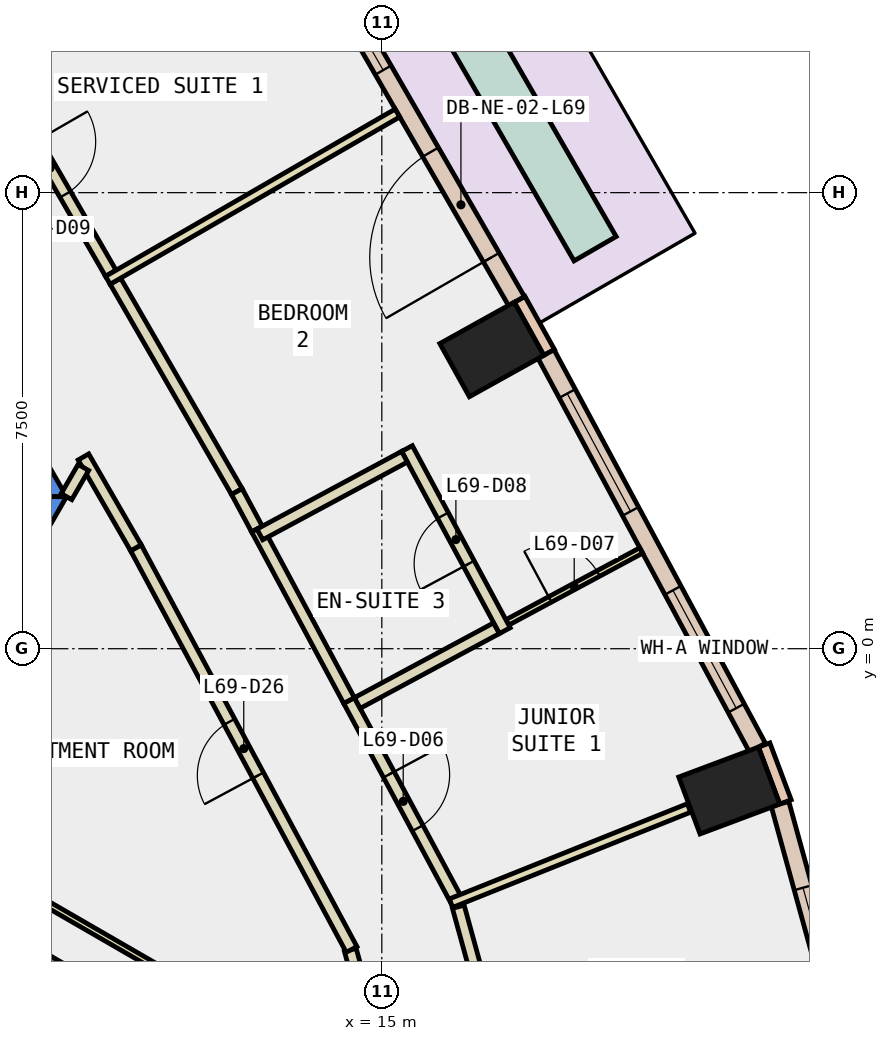
"""IFC4 building model, lengths in metres.
Left out: names, types, materials, properties, quantities, classifications, styles, units other than length and angle.
Written with IfcOpenShell. Run it as: python <this file> out.ifc"""

import sys

from ifc_helpers import new_model, si_unit, direction, frame, frame_2d, origin, origin_2d, place, context, subcontext, project, spatial, polyline, rectangle, outline, extrude, element, fill, save


model = new_model("IFC4")
c1 = context("Model", 3, precision=1e-05, world=origin(), true_north=direction((0.0, 1.0)))
c2 = subcontext(c1, "Body", "Model", "MODEL_VIEW")
j1 = project(units=[si_unit("LENGTHUNIT", "METRE"), si_unit("PLANEANGLEUNIT", "RADIAN")], contexts=[c1])
p1 = place(None, origin())
s1 = spatial("IfcSite", under=j1, at=p1, CompositionType="ELEMENT")
p2 = place(p1, origin())
s2 = spatial("IfcBuilding", under=s1, at=p2, CompositionType="ELEMENT")
p3 = place(p2, frame((0.0, 0.0, 297.2)))
s3 = spatial("IfcBuildingStorey", under=s2, at=p3, CompositionType="ELEMENT", Elevation=297.2)
for number, where, z_axis, x_axis in (
    (1, (20.714, -2.333, -0.34), (0.0, 0.0, 1.0), (-0.351, 0.936, 0.0)),
    (2, (16.809, 4.921, -0.34), (0.0, 0.0, 1.0), (-0.486, 0.874, 0.0)),
):
    element("IfcColumn", number, at=place(p3, frame(where, z_axis=z_axis, x_axis=x_axis)), inside=s3, PredefinedType="COLUMN", context=c2, shape_type="SweptSolid", body=[
        extrude(rectangle(XDim=1.0, YDim=1.4, at=origin_2d()), origin(), (0.0, 0.0, 1.0), 3.6),
    ])
p4 = place(p3, frame((0.0, 0.0, -0.34)))
e3 = element("IfcWall", 3, at=p4, inside=s3, PredefinedType="SHEAR", context=c2, shape_type="SweptSolid", body=[
    extrude(outline(polyline([(5.486, 9.998), (5.053, 9.748), (9.238, 2.5), (9.815, 2.5), (5.486, 9.998)])), origin(), (0.0, 0.0, 1.0), 3.6),
])
p5 = place(p3, frame((0.0, 0.0, -0.34)))
e4 = element("IfcWall", 4, at=p5, inside=s3, PredefinedType="SHEAR", context=c2, shape_type="SweptSolid", body=[
    extrude(outline(polyline([(4.907, -6.0), (9.815, 2.5), (9.238, 2.5), (4.619, -5.5), (4.907, -6.0)])), origin(), (0.0, 0.0, 1.0), 3.6),
])
p6 = place(p3, frame((6.279, -3.625, -0.34), z_axis=(0.0, 0.0, 1.0), x_axis=(0.866017533419, -0.500013631625, 0.0)))
e5 = element("IfcWall", 5, at=p6, inside=s3, PredefinedType="SHEAR", context=c2, shape_type="SweptSolid", body=[
    extrude(rectangle(XDim=9.0, YDim=0.8, at=frame_2d((4.5, 0.0))), origin(), (0.0, 0.0, 1.0), 3.6),
])
p7 = place(p3, frame((21.639, -2.52, 0.0), z_axis=(0.0, 0.0, 1.0), x_axis=(-0.350962844851, 0.936389385637, 0.0)))
e6 = element("IfcWall", 6, at=p7, inside=s3, PredefinedType="STANDARD", context=c2, shape_type="SweptSolid", body=[
    extrude(rectangle(XDim=1.0, YDim=0.2, at=frame_2d((0.5, 0.0))), origin(), (0.0, 0.0, 1.0), 3.26),
])
p8 = place(p3, frame((17.752, 4.872, 0.0), z_axis=(0.0, 0.0, 1.0), x_axis=(-0.485850211157, 0.874042088414, 0.0)))
e7 = element("IfcWall", 7, at=p8, inside=s3, PredefinedType="STANDARD", context=c2, shape_type="SweptSolid", body=[
    extrude(rectangle(XDim=1.0, YDim=0.2, at=frame_2d((0.5, 0.0))), origin(), (0.0, 0.0, 1.0), 3.26),
])
p9 = place(p3, frame((22.677, -6.659, 0.0), z_axis=(0.0, 0.0, 1.0), x_axis=(-0.264892613927, 0.964277917971, 0.0)))
e8 = element("IfcWall", 8, at=p9, inside=s3, PredefinedType="STANDARD", context=c2, shape_type="SweptSolid", body=[
    extrude(rectangle(XDim=4.258, YDim=0.3, at=frame_2d((2.129, 0.0))), origin(), (0.0, 0.0, 1.0), 3.26),
])
p10 = place(p9, frame((1.429, 0.0, 0.9)))
e9 = element("IfcOpeningElement", 9, at=p10, cuts=e8, PredefinedType="OPENING", context=c2, shape_type="SweptSolid", body=[
    extrude(rectangle(XDim=1.4, YDim=2.0, at=frame_2d((0.7, 1.0))), frame((0.0, 0.16, 0.0), z_axis=(0.0, -1.0, 0.0), x_axis=(1.0, 0.0, 0.0)), (0.0, 0.0, 1.0), 0.32),
])
p11 = place(p3, frame((21.177, -1.626, 0.0), z_axis=(0.0, 0.0, 1.0), x_axis=(-0.473225522632, 0.880941317415, 0.0)))
e10 = element("IfcWall", 10, at=p11, inside=s3, PredefinedType="STANDARD", context=c2, shape_type="SweptSolid", body=[
    extrude(rectangle(XDim=7.345, YDim=0.3, at=frame_2d((3.673, 0.0))), origin(), (0.0, 0.0, 1.0), 3.26),
])
p12 = place(p11, frame((0.736, 0.0, 0.9)))
e11 = element("IfcOpeningElement", 11, at=p12, cuts=e10, PredefinedType="OPENING", context=c2, shape_type="SweptSolid", body=[
    extrude(rectangle(XDim=2.2, YDim=2.0, at=frame_2d((1.1, 1.0))), frame((0.0, 0.16, 0.0), z_axis=(0.0, -1.0, 0.0), x_axis=(1.0, 0.0, 0.0)), (0.0, 0.0, 1.0), 0.32),
])
p13 = place(p11, frame((4.409, 0.0, 0.9)))
e12 = element("IfcOpeningElement", 12, at=p13, cuts=e10, PredefinedType="OPENING", context=c2, shape_type="SweptSolid", body=[
    extrude(rectangle(XDim=2.2, YDim=2.0, at=frame_2d((1.1, 1.0))), frame((0.0, 0.16, 0.0), z_axis=(0.0, -1.0, 0.0), x_axis=(1.0, 0.0, 0.0)), (0.0, 0.0, 1.0), 0.32),
])
p14 = place(p3, frame((17.215, 5.717, 0.0), z_axis=(0.0, 0.0, 1.0), x_axis=(-0.499905472729, 0.866079972252, 0.0)))
e13 = element("IfcWall", 13, at=p14, inside=s3, PredefinedType="STANDARD", context=c2, shape_type="SweptSolid", body=[
    extrude(rectangle(XDim=7.313, YDim=0.3, at=frame_2d((3.657, 0.0))), origin(), (0.0, 0.0, 1.0), 3.26),
])
p15 = place(p14, frame((0.828, 0.0, 0.0)))
e14 = element("IfcOpeningElement", 14, at=p15, cuts=e13, PredefinedType="OPENING", context=c2, shape_type="SweptSolid", body=[
    extrude(rectangle(XDim=2.0, YDim=2.4, at=frame_2d((1.0, 1.2))), frame((0.0, 0.16, 0.0), z_axis=(0.0, -1.0, 0.0), x_axis=(1.0, 0.0, 0.0)), (0.0, 0.0, 1.0), 0.32),
])
p16 = place(p14, frame((4.385, 0.0, 0.9)))
e15 = element("IfcOpeningElement", 15, at=p16, cuts=e13, PredefinedType="OPENING", context=c2, shape_type="SweptSolid", body=[
    extrude(rectangle(XDim=2.2, YDim=2.0, at=frame_2d((1.1, 1.0))), frame((0.0, 0.16, 0.0), z_axis=(0.0, -1.0, 0.0), x_axis=(1.0, 0.0, 0.0)), (0.0, 0.0, 1.0), 0.32),
])
p17 = place(p3, frame((18.508, 6.578, 0.0), z_axis=(0.0, 0.0, 1.0), x_axis=(-0.500043210338, 0.866000454847, 0.0)))
e16 = element("IfcWall", 16, at=p17, inside=s3, PredefinedType="STANDARD", context=c2, shape_type="SweptSolid", body=[
    extrude(rectangle(XDim=7.115, YDim=0.8, at=frame_2d((3.558, 0.0))), origin(), (0.0, 0.0, 1.0), 0.8),
])
p18 = place(p3, frame((14.779, -6.032, 0.0), z_axis=(0.0, 0.0, 1.0), x_axis=(-0.265740072272, 0.964044715762, 0.0)))
e17 = element("IfcWall", 17, at=p18, inside=s3, PredefinedType="PARTITIONING", context=c2, shape_type="SweptSolid", body=[
    extrude(rectangle(XDim=1.118, YDim=0.2, at=frame_2d((0.559, 0.0))), origin(), (0.0, 0.0, 1.0), 3.26),
])
p19 = place(p3, frame((14.503, -4.946, 0.0), z_axis=(0.0, 0.0, 1.0), x_axis=(-0.473101362557, 0.881008002658, 0.0)))
e18 = element("IfcWall", 18, at=p19, inside=s3, PredefinedType="PARTITIONING", context=c2, shape_type="SweptSolid", body=[
    extrude(rectangle(XDim=7.497, YDim=0.2, at=frame_2d((3.749, 0.0))), origin(), (0.0, 0.0, 1.0), 3.26),
])
p20 = place(p19, frame((3.249, 0.0, 0.0)))
e19 = element("IfcOpeningElement", 19, at=p20, cuts=e18, PredefinedType="OPENING", context=c2, shape_type="SweptSolid", body=[
    extrude(rectangle(XDim=1.0, YDim=2.1, at=frame_2d((0.5, 1.05))), frame((0.0, 0.11, 0.0), z_axis=(0.0, -1.0, 0.0), x_axis=(1.0, 0.0, 0.0)), (0.0, 0.0, 1.0), 0.22),
])
p21 = place(p3, frame((10.956, 1.659, 0.0), z_axis=(0.0, 0.0, 1.0), x_axis=(-0.49992648901, 0.866067841215, 0.0)))
e20 = element("IfcWall", 20, at=p21, inside=s3, PredefinedType="PARTITIONING", context=c2, shape_type="SweptSolid", body=[
    extrude(rectangle(XDim=1.726, YDim=0.2, at=frame_2d((0.863, 0.0))), origin(), (0.0, 0.0, 1.0), 3.26),
])
p22 = place(p3, frame((10.092, 2.981, 0.0), z_axis=(0.0, 0.0, 1.0), x_axis=(-0.501296484717, -0.865275582927, 0.0)))
e21 = element("IfcWall", 21, at=p22, inside=s3, PredefinedType="PARTITIONING", context=c2, shape_type="SweptSolid", body=[
    extrude(rectangle(XDim=0.555, YDim=0.2, at=frame_2d((0.277, 0.0))), origin(), (0.0, 0.0, 1.0), 3.26),
])
p23 = place(p3, frame((16.258, -4.244, 0.0), z_axis=(0.0, 0.0, 1.0), x_axis=(0.264930673246, -0.964267462053, 0.0)))
e22 = element("IfcWall", 22, at=p23, inside=s3, PredefinedType="PARTITIONING", context=c2, shape_type="SweptSolid", body=[
    extrude(rectangle(XDim=3.166, YDim=0.2, at=frame_2d((1.583, 0.0))), origin(), (0.0, 0.0, 1.0), 3.26),
])
p24 = place(p3, frame((14.461, -0.852, 0.0), z_axis=(0.0, 0.0, 1.0), x_axis=(0.473160180459, -0.88097641491, 0.0)))
e23 = element("IfcWall", 23, at=p24, inside=s3, PredefinedType="PARTITIONING", context=c2, shape_type="SweptSolid", body=[
    extrude(rectangle(XDim=3.766, YDim=0.2, at=frame_2d((1.883, 0.0))), origin(), (0.0, 0.0, 1.0), 3.26),
])
p25 = place(p24, frame((1.383, 0.0, 0.0)))
e24 = element("IfcOpeningElement", 24, at=p25, cuts=e23, PredefinedType="OPENING", context=c2, shape_type="SweptSolid", body=[
    extrude(rectangle(XDim=1.0, YDim=2.1, at=frame_2d((0.5, 1.05))), frame((0.0, 0.11, 0.0), z_axis=(0.0, -1.0, 0.0), x_axis=(1.0, 0.0, 0.0)), (0.0, 0.0, 1.0), 0.22),
])
p26 = place(p3, frame((10.618, 6.044, 0.0), z_axis=(0.0, 0.0, 1.0), x_axis=(0.50008212199, -0.86597798544, 0.0)))
e25 = element("IfcWall", 25, at=p26, inside=s3, PredefinedType="PARTITIONING", context=c2, shape_type="SweptSolid", body=[
    extrude(rectangle(XDim=3.995, YDim=0.2, at=frame_2d((1.998, 0.0))), origin(), (0.0, 0.0, 1.0), 3.26),
])
p27 = place(p3, frame((12.616, 2.584, 0.0), z_axis=(0.0, 0.0, 1.0), x_axis=(0.472830911699, -0.881153181315, 0.0)))
e26 = element("IfcWall", 26, at=p27, inside=s3, PredefinedType="PARTITIONING", context=c2, shape_type="SweptSolid", body=[
    extrude(rectangle(XDim=0.7, YDim=0.2, at=frame_2d((0.35, 0.0))), origin(), (0.0, 0.0, 1.0), 3.26),
])
p28 = place(p3, frame((12.947, 1.967, 0.0), z_axis=(0.0, 0.0, 1.0), x_axis=(0.473116768279, -0.88099972961, 0.0)))
e27 = element("IfcWall", 27, at=p28, inside=s3, PredefinedType="PARTITIONING", context=c2, shape_type="SweptSolid", body=[
    extrude(rectangle(XDim=3.2, YDim=0.2, at=frame_2d((1.6, 0.0))), origin(), (0.0, 0.0, 1.0), 3.26),
])
p29 = place(p3, frame((8.545, 9.634, 0.0), z_axis=(0.0, 0.0, 1.0), x_axis=(0.50008212199, -0.86597798544, 0.0)))
e28 = element("IfcWall", 28, at=p29, inside=s3, PredefinedType="PARTITIONING", context=c2, shape_type="SweptSolid", body=[
    extrude(rectangle(XDim=3.995, YDim=0.2, at=frame_2d((1.998, 0.0))), origin(), (0.0, 0.0, 1.0), 3.26),
])
p30 = place(p29, frame((1.498, 0.0, 0.0)))
e29 = element("IfcOpeningElement", 29, at=p30, cuts=e28, PredefinedType="OPENING", context=c2, shape_type="SweptSolid", body=[
    extrude(rectangle(XDim=1.0, YDim=2.1, at=frame_2d((0.5, 1.05))), frame((0.0, 0.11, 0.0), z_axis=(0.0, -1.0, 0.0), x_axis=(1.0, 0.0, 0.0)), (0.0, 0.0, 1.0), 0.22),
])
p31 = place(p3, frame((6.835, -2.662, 0.0), z_axis=(0.0, 0.0, 1.0), x_axis=(0.866023427642, -0.500003422764, 0.0)))
e30 = element("IfcWall", 30, at=p31, inside=s3, PredefinedType="PARTITIONING", context=c2, shape_type="SweptSolid", body=[
    extrude(rectangle(XDim=8.65, YDim=0.1, at=frame_2d((4.325, 0.0))), origin(), (0.0, 0.0, 1.0), 3.26),
])
p32 = place(p3, frame((16.138, -4.185, 0.0), z_axis=(0.0, 0.0, 1.0), x_axis=(0.928432751736, 0.371500505388, 0.0)))
e31 = element("IfcWall", 31, at=p32, inside=s3, PredefinedType="PARTITIONING", context=c2, shape_type="SweptSolid", body=[
    extrude(rectangle(XDim=4.216, YDim=0.15, at=frame_2d((2.108, 0.0))), origin(), (0.0, 0.0, 1.0), 3.26),
])
p33 = place(p3, frame((17.063, 0.432, 0.0), z_axis=(0.0, 0.0, 1.0), x_axis=(0.881003472222, 0.473109799024, 0.0)))
e32 = element("IfcWall", 32, at=p33, inside=s3, PredefinedType="PARTITIONING", context=c2, shape_type="SweptSolid", body=[
    extrude(rectangle(XDim=2.501, YDim=0.1, at=frame_2d((1.25, 0.0))), origin(), (0.0, 0.0, 1.0), 3.26),
])
p34 = place(p33, frame((0.8, 0.0, 0.0)))
e33 = element("IfcOpeningElement", 33, at=p34, cuts=e32, PredefinedType="OPENING", context=c2, shape_type="SweptSolid", body=[
    extrude(rectangle(XDim=0.9, YDim=2.1, at=frame_2d((0.45, 1.05))), frame((0.0, 0.06, 0.0), z_axis=(0.0, -1.0, 0.0), x_axis=(1.0, 0.0, 0.0)), (0.0, 0.0, 1.0), 0.12),
])
p35 = place(p3, frame((14.597, -0.893, 0.0), z_axis=(0.0, 0.0, 1.0), x_axis=(0.880971229432, 0.473169835168, 0.0)))
e34 = element("IfcWall", 34, at=p35, inside=s3, PredefinedType="PARTITIONING", context=c2, shape_type="SweptSolid", body=[
    extrude(rectangle(XDim=2.599, YDim=0.2, at=frame_2d((1.3, 0.0))), origin(), (0.0, 0.0, 1.0), 3.26),
])
p36 = place(p3, frame((17.023, 0.297, 0.0), z_axis=(0.0, 0.0, 1.0), x_axis=(-0.473247398557, 0.88092956572, 0.0)))
e35 = element("IfcWall", 35, at=p36, inside=s3, PredefinedType="PARTITIONING", context=c2, shape_type="SweptSolid", body=[
    extrude(rectangle(XDim=3.4, YDim=0.2, at=frame_2d((1.7, 0.0))), origin(), (0.0, 0.0, 1.0), 3.26),
])
p37 = place(p36, frame((1.25, 0.0, 0.0)))
e36 = element("IfcOpeningElement", 36, at=p37, cuts=e35, PredefinedType="OPENING", context=c2, shape_type="SweptSolid", body=[
    extrude(rectangle(XDim=0.9, YDim=2.1, at=frame_2d((0.45, 1.05))), frame((0.0, 0.11, 0.0), z_axis=(0.0, -1.0, 0.0), x_axis=(1.0, 0.0, 0.0)), (0.0, 0.0, 1.0), 0.22),
])
p38 = place(p3, frame((15.373, 3.157, 0.0), z_axis=(0.0, 0.0, 1.0), x_axis=(-0.880935111027, -0.473237076062, 0.0)))
e37 = element("IfcWall", 37, at=p38, inside=s3, PredefinedType="PARTITIONING", context=c2, shape_type="SweptSolid", body=[
    extrude(rectangle(XDim=2.701, YDim=0.2, at=frame_2d((1.35, 0.0))), origin(), (0.0, 0.0, 1.0), 3.26),
])
p39 = place(p3, frame((10.494, 6.059, 0.0), z_axis=(0.0, 0.0, 1.0), x_axis=(0.866027397988, 0.499996545922, 0.0)))
e38 = element("IfcWall", 38, at=p39, inside=s3, PredefinedType="PARTITIONING", context=c2, shape_type="SweptSolid", body=[
    extrude(rectangle(XDim=5.5, YDim=0.15, at=frame_2d((2.75, 0.0))), origin(), (0.0, 0.0, 1.0), 3.26),
])
p40 = place(p10, origin())
e39 = element("IfcWindow", 39, at=p40, inside=s3, PartitioningType="SINGLE_PANEL", PredefinedType="WINDOW", context=c2, shape_type="SweptSolid", body=[
    extrude(rectangle(XDim=1.4, YDim=2.0, at=frame_2d((0.7, 1.0))), frame((0.0, 0.03, 0.0), z_axis=(0.0, -1.0, 0.0), x_axis=(1.0, 0.0, 0.0)), (0.0, 0.0, 1.0), 0.06),
])
fill(e9, e39)
p41 = place(p12, origin())
e40 = element("IfcWindow", 40, at=p41, inside=s3, PartitioningType="SINGLE_PANEL", PredefinedType="WINDOW", context=c2, shape_type="SweptSolid", body=[
    extrude(rectangle(XDim=2.2, YDim=2.0, at=frame_2d((1.1, 1.0))), frame((0.0, 0.03, 0.0), z_axis=(0.0, -1.0, 0.0), x_axis=(1.0, 0.0, 0.0)), (0.0, 0.0, 1.0), 0.06),
])
fill(e11, e40)
p42 = place(p13, origin())
e41 = element("IfcWindow", 41, at=p42, inside=s3, PartitioningType="SINGLE_PANEL", PredefinedType="WINDOW", context=c2, shape_type="SweptSolid", body=[
    extrude(rectangle(XDim=2.2, YDim=2.0, at=frame_2d((1.1, 1.0))), frame((0.0, 0.03, 0.0), z_axis=(0.0, -1.0, 0.0), x_axis=(1.0, 0.0, 0.0)), (0.0, 0.0, 1.0), 0.06),
])
fill(e12, e41)
p43 = place(p15, origin())
e42 = element("IfcDoor", 42, at=p43, inside=s3, OperationType="SLIDING_TO_LEFT", PredefinedType="DOOR", context=c2, shape_type="SweptSolid", body=[
    extrude(rectangle(XDim=2.0, YDim=2.4, at=frame_2d((1.0, 1.2))), frame((0.0, 0.025, 0.0), z_axis=(0.0, -1.0, 0.0), x_axis=(1.0, 0.0, 0.0)), (0.0, 0.0, 1.0), 0.05),
])
fill(e14, e42)
p44 = place(p16, origin())
e43 = element("IfcWindow", 43, at=p44, inside=s3, PartitioningType="SINGLE_PANEL", PredefinedType="WINDOW", context=c2, shape_type="SweptSolid", body=[
    extrude(rectangle(XDim=2.2, YDim=2.0, at=frame_2d((1.1, 1.0))), frame((0.0, 0.03, 0.0), z_axis=(0.0, -1.0, 0.0), x_axis=(1.0, 0.0, 0.0)), (0.0, 0.0, 1.0), 0.06),
])
fill(e15, e43)
p45 = place(p25, origin())
e44 = element("IfcDoor", 44, at=p45, inside=s3, OperationType="SINGLE_SWING_LEFT", PredefinedType="DOOR", context=c2, shape_type="SweptSolid", body=[
    extrude(rectangle(XDim=1.0, YDim=2.1, at=frame_2d((0.5, 1.05))), frame((0.0, 0.025, 0.0), z_axis=(0.0, -1.0, 0.0), x_axis=(1.0, 0.0, 0.0)), (0.0, 0.0, 1.0), 0.05),
])
fill(e24, e44)
p46 = place(p34, origin())
e45 = element("IfcDoor", 45, at=p46, inside=s3, OperationType="SINGLE_SWING_LEFT", PredefinedType="DOOR", context=c2, shape_type="SweptSolid", body=[
    extrude(rectangle(XDim=0.9, YDim=2.1, at=frame_2d((0.45, 1.05))), frame((0.0, 0.025, 0.0), z_axis=(0.0, -1.0, 0.0), x_axis=(1.0, 0.0, 0.0)), (0.0, 0.0, 1.0), 0.05),
])
fill(e33, e45)
p47 = place(p37, origin())
e46 = element("IfcDoor", 46, at=p47, inside=s3, OperationType="SINGLE_SWING_LEFT", PredefinedType="DOOR", context=c2, shape_type="SweptSolid", body=[
    extrude(rectangle(XDim=0.9, YDim=2.1, at=frame_2d((0.45, 1.05))), frame((0.0, 0.025, 0.0), z_axis=(0.0, -1.0, 0.0), x_axis=(1.0, 0.0, 0.0)), (0.0, 0.0, 1.0), 0.05),
])
fill(e36, e46)
p48 = place(p30, origin())
e47 = element("IfcDoor", 47, at=p48, inside=s3, OperationType="SINGLE_SWING_LEFT", PredefinedType="DOOR", context=c2, shape_type="SweptSolid", body=[
    extrude(rectangle(XDim=1.0, YDim=2.1, at=frame_2d((0.5, 1.05))), frame((0.0, 0.025, 0.0), z_axis=(0.0, -1.0, 0.0), x_axis=(1.0, 0.0, 0.0)), (0.0, 0.0, 1.0), 0.05),
])
fill(e29, e47)
p49 = place(p20, origin())
e48 = element("IfcDoor", 48, at=p49, inside=s3, OperationType="SINGLE_SWING_LEFT", PredefinedType="DOOR", context=c2, shape_type="SweptSolid", body=[
    extrude(rectangle(XDim=1.0, YDim=2.1, at=frame_2d((0.5, 1.05))), frame((0.0, 0.025, 0.0), z_axis=(0.0, -1.0, 0.0), x_axis=(1.0, 0.0, 0.0)), (0.0, 0.0, 1.0), 0.05),
])
fill(e19, e48)
save(model, sys.argv[1])
